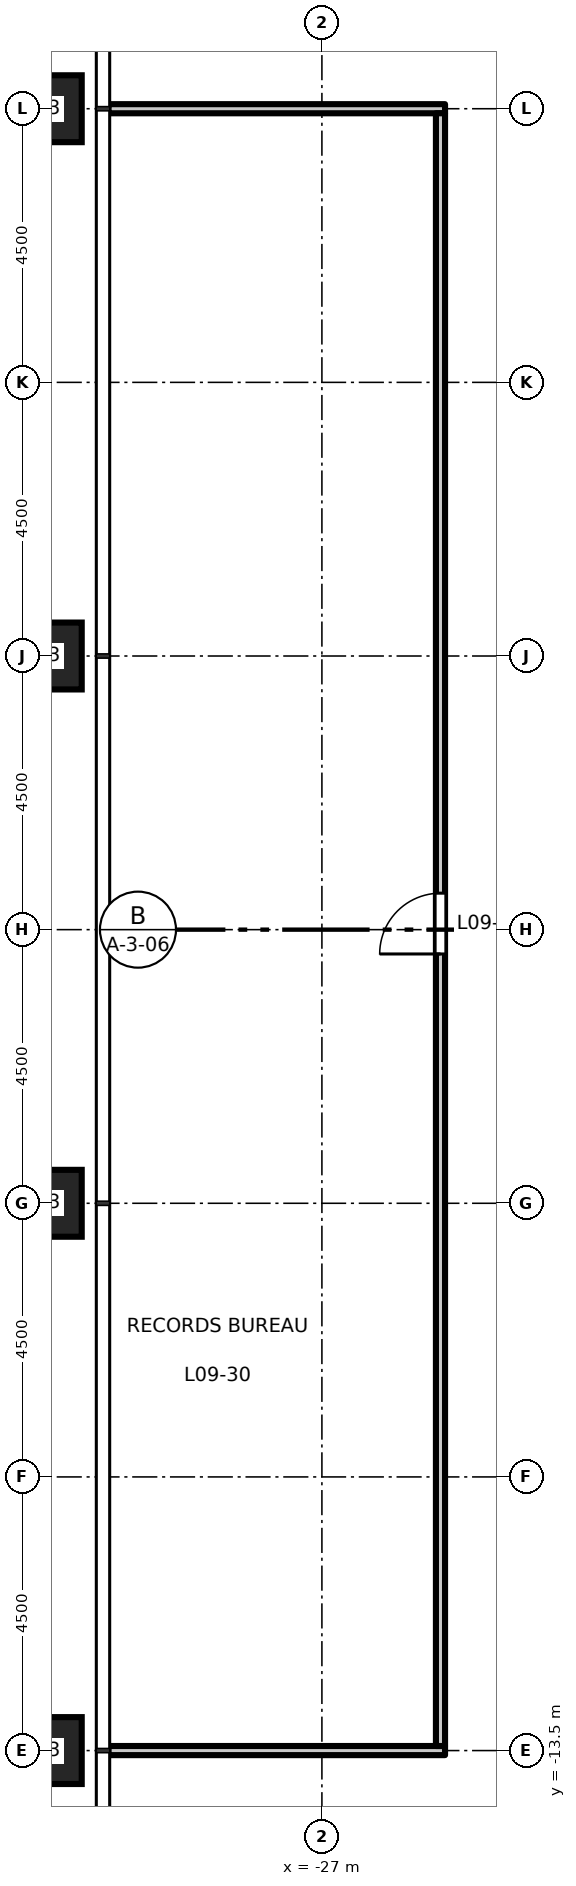
"""IFC4 building model, lengths in metres.
Left out: names, types, materials, properties, quantities, classifications, styles, units other than length and angle.
Written with IfcOpenShell. Run it as: python <this file> out.ifc"""

import sys

from ifc_helpers import new_model, si_unit, direction, frame, frame_2d, origin, origin_2d, place, context, subcontext, project, spatial, rectangle, hollow_rectangle, extrude, element, fill, save


model = new_model("IFC4")
c1 = context("Model", 3, precision=1e-05, world=origin(), true_north=direction((0.0, 1.0)))
c2 = subcontext(c1, "Body", "Model", "MODEL_VIEW")
j1 = project(units=[si_unit("LENGTHUNIT", "METRE"), si_unit("PLANEANGLEUNIT", "RADIAN")], contexts=[c1])
p1 = place(None, origin())
s1 = spatial("IfcSite", under=j1, at=p1, CompositionType="ELEMENT")
p2 = place(p1, origin())
s2 = spatial("IfcBuilding", under=s1, at=p2, CompositionType="ELEMENT")
p3 = place(p2, frame((0.0, 0.0, 44.7)))
s3 = spatial("IfcBuildingStorey", under=s2, at=p3, CompositionType="ELEMENT", Elevation=44.7)
for number, where, z_axis, x_axis in (
    (1, (-31.5, 13.5, 0.0), (0.0, 0.0, 1.0), (1.0, 0.0, 0.0)),
    (2, (-31.5, 4.5, 0.0), (0.0, 0.0, 1.0), (1.0, 0.0, 0.0)),
    (3, (-31.5, -4.5, 0.0), (0.0, 0.0, 1.0), (1.0, 0.0, 0.0)),
    (4, (-31.5, -13.5, 0.0), (0.0, 0.0, 1.0), (1.0, 0.0, 0.0)),
):
    element("IfcColumn", number, at=place(p3, frame(where, z_axis=z_axis, x_axis=x_axis)), inside=s3, PredefinedType="COLUMN", context=c2, shape_type="SweptSolid", body=[
        extrude(hollow_rectangle(XDim=1.1, YDim=1.1, WallThickness=0.07, at=origin_2d()), origin(), (0.0, 0.0, 1.0), 4.5),
    ])
for number, where, z_axis, x_axis in (
    (5, (-30.51, -13.5, 0.0), (0.0, 0.0, 1.0), (1.0, 0.0, 0.0)),
    (6, (-30.51, 13.5, 0.0), (0.0, 0.0, 1.0), (1.0, 0.0, 0.0)),
):
    element("IfcWall", number, at=place(p3, frame(where, z_axis=z_axis, x_axis=x_axis)), inside=s3, PredefinedType="PARTITIONING", context=c2, shape_type="SweptSolid", body=[
        extrude(rectangle(XDim=5.535, YDim=0.15, at=frame_2d((2.768, 0.0))), origin(), (0.0, 0.0, 1.0), 3.35),
    ])
p4 = place(p3, frame((-25.05, -13.425, 0.0), z_axis=(0.0, 0.0, 1.0), x_axis=(0.0, 1.0, 0.0)))
e7 = element("IfcWall", 7, at=p4, inside=s3, PredefinedType="PARTITIONING", context=c2, shape_type="SweptSolid", body=[
    extrude(rectangle(XDim=26.85, YDim=0.15, at=frame_2d((13.425, 0.0))), origin(), (0.0, 0.0, 1.0), 4.35),
])
p5 = place(p4, frame((13.025, 0.0, 0.0)))
e8 = element("IfcOpeningElement", 8, at=p5, cuts=e7, PredefinedType="OPENING", context=c2, shape_type="SweptSolid", body=[
    extrude(rectangle(XDim=1.0, YDim=2.1, at=frame_2d((0.5, 1.05))), frame((0.0, 0.085, 0.0), z_axis=(0.0, -1.0, 0.0), x_axis=(1.0, 0.0, 0.0)), (0.0, 0.0, 1.0), 0.17),
])
p6 = place(p5, origin())
e9 = element("IfcDoor", 9, at=p6, inside=s3, OperationType="SINGLE_SWING_LEFT", PredefinedType="DOOR", context=c2, shape_type="SweptSolid", body=[
    extrude(rectangle(XDim=1.0, YDim=2.1, at=frame_2d((0.5, 1.05))), frame((0.0, 0.025, 0.0), z_axis=(0.0, -1.0, 0.0), x_axis=(1.0, 0.0, 0.0)), (0.0, 0.0, 1.0), 0.05),
])
fill(e8, e9)
save(model, sys.argv[1])
